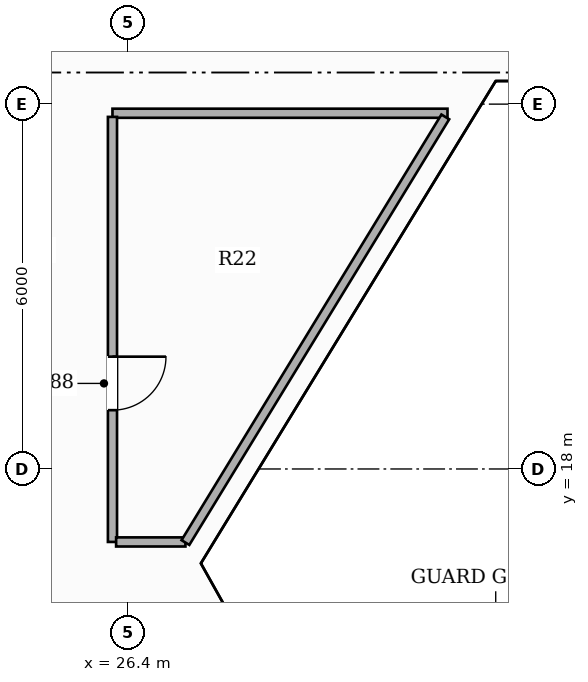
"""IFC4 building model, lengths in metres.
Left out: names, types, materials, properties, quantities, classifications, styles, units other than length and angle.
Written with IfcOpenShell. Run it as: python <this file> out.ifc"""

import sys

from ifc_helpers import new_model, si_unit, direction, frame, frame_2d, origin, place, context, subcontext, project, spatial, rectangle, extrude, element, fill, save


model = new_model("IFC4")
c1 = context("Model", 3, precision=1e-05, world=origin(), true_north=direction((0.0, 1.0)))
c2 = subcontext(c1, "Body", "Model", "MODEL_VIEW")
j1 = project(units=[si_unit("LENGTHUNIT", "METRE"), si_unit("PLANEANGLEUNIT", "RADIAN")], contexts=[c1])
p1 = place(None, origin())
s1 = spatial("IfcSite", under=j1, at=p1, CompositionType="ELEMENT")
p2 = place(p1, origin())
s2 = spatial("IfcBuilding", under=s1, at=p2, CompositionType="ELEMENT")
p3 = place(p2, frame((0.0, 0.0, 80.75)))
s3 = spatial("IfcBuildingStorey", under=s2, at=p3, CompositionType="ELEMENT", Elevation=80.75)
p4 = place(p3, frame((31.66, 23.85, 0.0), z_axis=(0.0, 0.0, 1.0), x_axis=(-1.0, 0.0, 0.0)))
e1 = element("IfcWall", 1, at=p4, inside=s3, PredefinedType="PARTITIONING", context=c2, shape_type="SweptSolid", body=[
    extrude(rectangle(XDim=5.51, YDim=0.15, at=frame_2d((2.755, 0.0))), origin(), (0.0, 0.0, 1.0), 2.669),
])
p5 = place(p3, frame((26.15, 23.79, 0.0), z_axis=(0.0, 0.0, 1.0), x_axis=(0.0, -1.0, 0.0)))
e2 = element("IfcWall", 2, at=p5, inside=s3, PredefinedType="PARTITIONING", context=c2, shape_type="SweptSolid", body=[
    extrude(rectangle(XDim=6.99, YDim=0.15, at=frame_2d((3.495, 0.0))), origin(), (0.0, 0.0, 1.0), 2.669),
])
p6 = place(p5, frame((3.943, 0.0, 0.0)))
e3 = element("IfcOpeningElement", 3, at=p6, cuts=e2, PredefinedType="OPENING", context=c2, shape_type="SweptSolid", body=[
    extrude(rectangle(XDim=0.88, YDim=2.1, at=frame_2d((0.44, 1.05))), frame((0.0, 0.085, 0.0), z_axis=(0.0, -1.0, 0.0), x_axis=(1.0, 0.0, 0.0)), (0.0, 0.0, 1.0), 0.17),
])
p7 = place(p3, frame((26.21, 16.8, 0.0), z_axis=(0.0, 0.0, 1.0), x_axis=(1.0, 0.0, 0.0)))
e4 = element("IfcWall", 4, at=p7, inside=s3, PredefinedType="PARTITIONING", context=c2, shape_type="SweptSolid", body=[
    extrude(rectangle(XDim=1.14, YDim=0.15, at=frame_2d((0.57, 0.0))), origin(), (0.0, 0.0, 1.0), 3.06),
])
p8 = place(p3, frame((27.35, 16.79, 0.0), z_axis=(0.0, 0.0, 1.0), x_axis=(0.521108010454, 0.853490738931, 0.0)))
e5 = element("IfcWall", 5, at=p8, inside=s3, PredefinedType="PARTITIONING", context=c2, shape_type="SweptSolid", body=[
    extrude(rectangle(XDim=8.202, YDim=0.15, at=frame_2d((4.101, 0.0))), origin(), (0.0, 0.0, 1.0), 2.669),
])
p9 = place(p6, origin())
e6 = element("IfcDoor", 6, at=p9, inside=s3, OperationType="SINGLE_SWING_LEFT", PredefinedType="DOOR", context=c2, shape_type="SweptSolid", body=[
    extrude(rectangle(XDim=0.88, YDim=2.1, at=frame_2d((0.44, 1.05))), frame((0.0, 0.025, 0.0), z_axis=(0.0, -1.0, 0.0), x_axis=(1.0, 0.0, 0.0)), (0.0, 0.0, 1.0), 0.05),
])
fill(e3, e6)
save(model, sys.argv[1])
